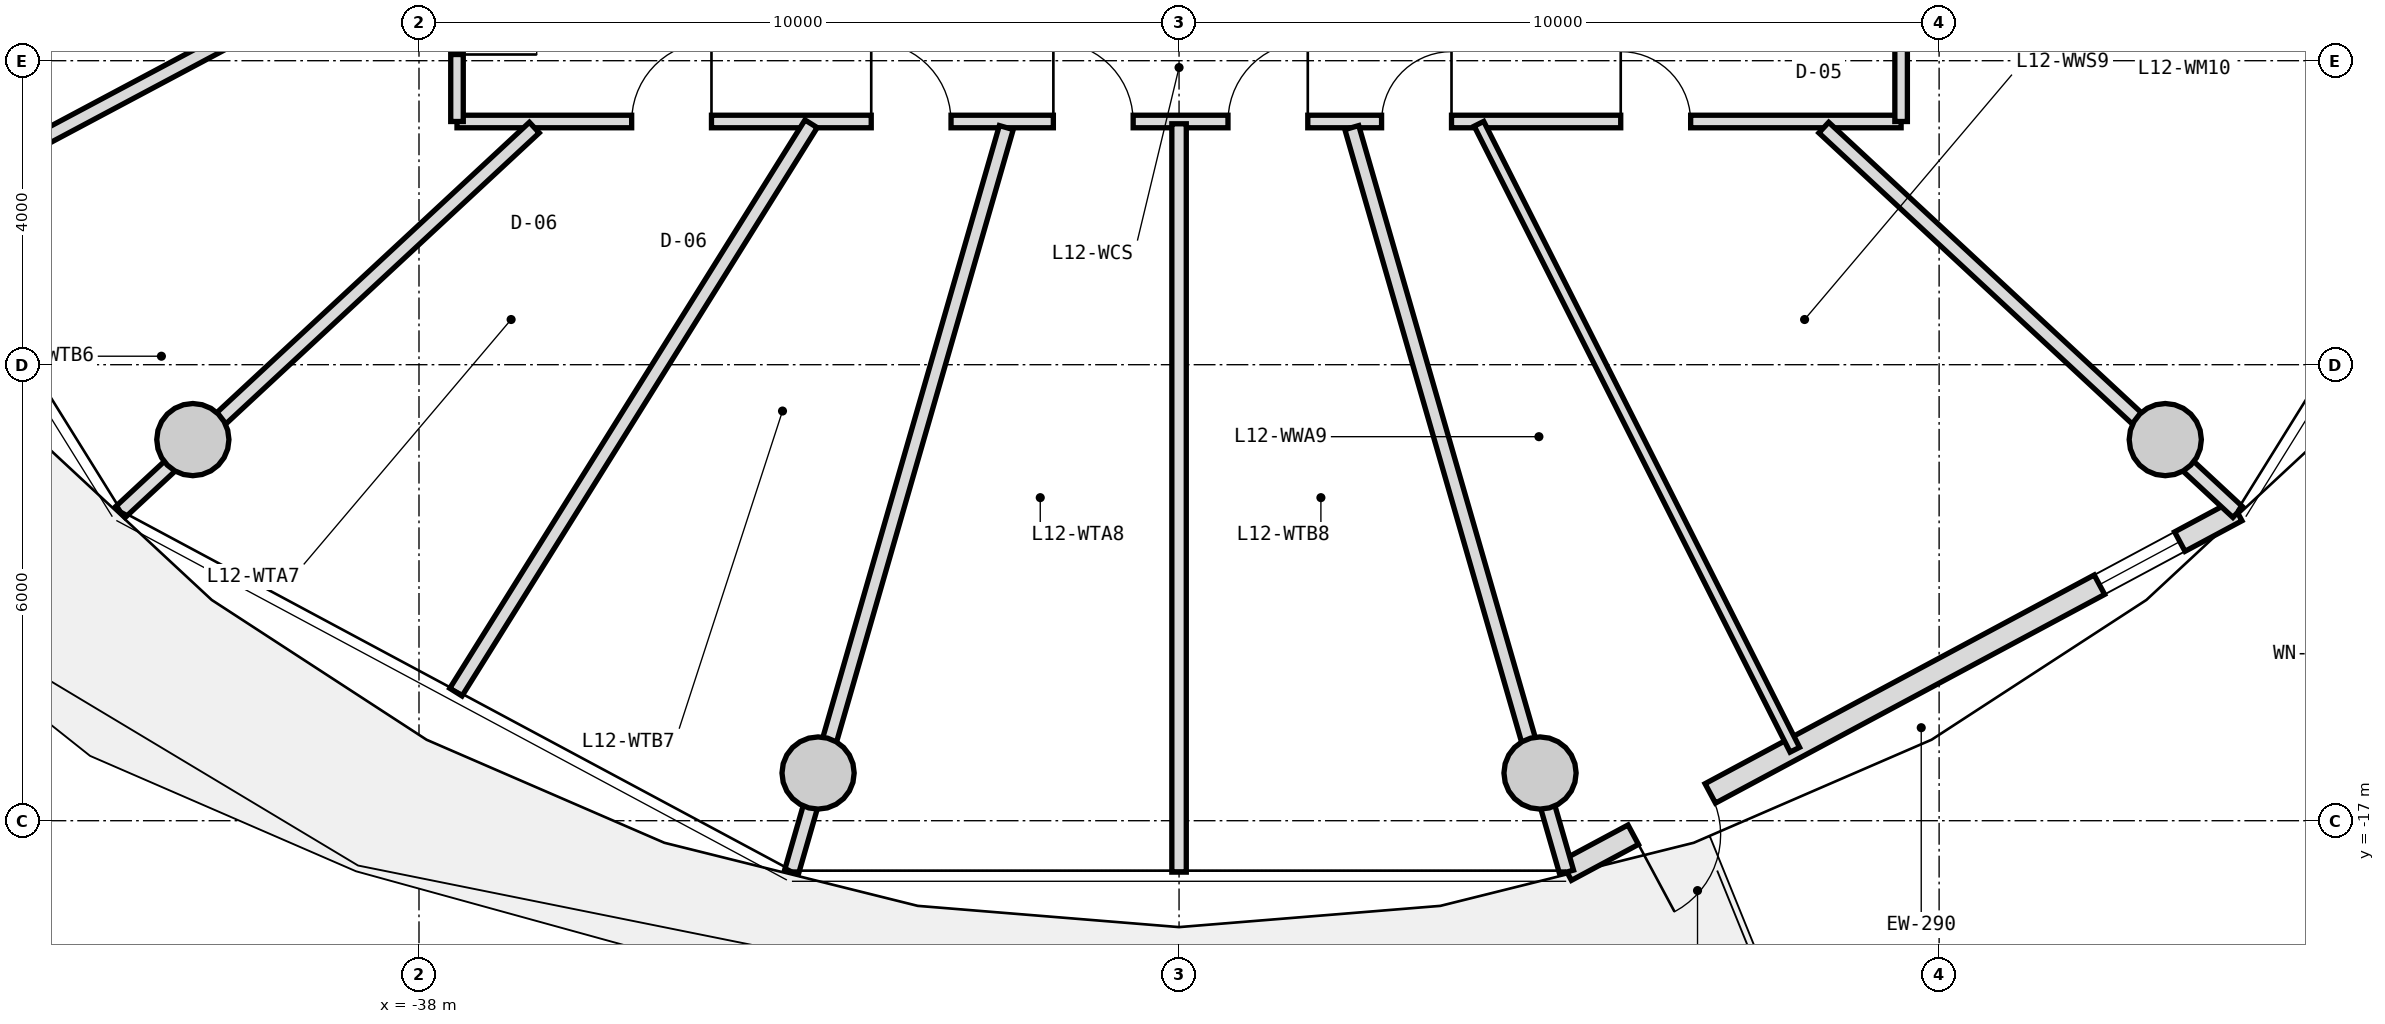
"""IFC4 building model, lengths in metres.
Left out: names, types, materials, properties, quantities, classifications, styles, units other than length and angle.
Written with IfcOpenShell. Run it as: python <this file> out.ifc"""

import sys

from ifc_helpers import new_model, si_unit, direction, frame, frame_2d, origin, origin_2d, place, context, subcontext, project, spatial, rectangle, circle, extrude, source, transform, mapped, element, fill, save


model = new_model("IFC4")
c1 = context("Model", 3, precision=1e-05, world=origin(), true_north=direction((0.0, 1.0)))
c2 = subcontext(c1, "Body", "Model", "MODEL_VIEW")
j1 = project(units=[si_unit("LENGTHUNIT", "METRE"), si_unit("PLANEANGLEUNIT", "RADIAN")], contexts=[c1])
p1 = place(None, origin())
s1 = spatial("IfcSite", under=j1, at=p1, CompositionType="ELEMENT")
p2 = place(p1, origin())
s2 = spatial("IfcBuilding", under=s1, at=p2, CompositionType="ELEMENT")
p3 = place(p2, frame((0.0, 0.0, 42.95)))
s3 = spatial("IfcBuildingStorey", under=s2, at=p3, CompositionType="ELEMENT", Elevation=42.95)
m1 = source(origin(), c2, "Body", "SweptSolid", [
    extrude(circle(Radius=0.475, at=origin_2d()), origin(), (0.0, 0.0, 1.0), 3.05),
])
for number, where, z_axis, x_axis in (
    (1, (-40.975, -11.985, 0.0), (0.0, 0.0, 1.0), (1.0, 0.0, 0.0)),
    (2, (-32.749, -16.373, 0.0), (0.0, 0.0, 1.0), (1.0, 0.0, 0.0)),
    (3, (-23.251, -16.373, 0.0), (0.0, 0.0, 1.0), (1.0, 0.0, 0.0)),
    (4, (-15.025, -11.985, 0.0), (0.0, 0.0, 1.0), (1.0, 0.0, 0.0)),
):
    element("IfcColumn", number, at=place(p3, frame(where, z_axis=z_axis, x_axis=x_axis)), inside=s3, PredefinedType="COLUMN", context=c2, shape_type="MappedRepresentation", body=[
        mapped(m1, transform((0.0, 0.0, 0.0), x_axis=(1.0, 0.0, 0.0), y_axis=(0.0, 1.0, 0.0), z_axis=(0.0, 0.0, 1.0), scale=1.0)),
    ])
m2 = source(origin(), c2, "Body", "SweptSolid", [
    extrude(rectangle(XDim=10.011, YDim=0.29, at=frame_2d((5.005, 0.0))), origin(), (0.0, 0.0, 1.0), 2.79),
])
p4 = place(p3, frame((-14.084, -12.926, 0.0), z_axis=(0.0, 0.0, 1.0), x_axis=(-0.881272505317, -0.472608475773, 0.0)))
e5 = element("IfcWall", 5, at=p4, inside=s3, PredefinedType="SOLIDWALL", context=c2, shape_type="MappedRepresentation", body=[
    mapped(m2, transform((0.0, 0.0, 0.0), x_axis=(1.0, 0.0, 0.0), y_axis=(0.0, 1.0, 0.0), z_axis=(0.0, 0.0, 1.0), scale=1.0)),
])
p5 = place(p4, frame((7.86, 0.0, 0.0)))
e6 = element("IfcOpeningElement", 6, at=p5, cuts=e5, PredefinedType="OPENING", context=c2, shape_type="SweptSolid", body=[
    extrude(rectangle(XDim=1.15, YDim=2.25, at=frame_2d((0.575, 1.125))), frame((0.0, 0.155, 0.0), z_axis=(0.0, -1.0, 0.0), x_axis=(1.0, 0.0, 0.0)), (0.0, 0.0, 1.0), 0.31),
])
p6 = place(p4, frame((0.85, 0.0, 0.85)))
e7 = element("IfcOpeningElement", 7, at=p6, cuts=e5, PredefinedType="OPENING", context=c2, shape_type="SweptSolid", body=[
    extrude(rectangle(XDim=1.2, YDim=1.5, at=frame_2d((0.6, 0.75))), frame((0.0, 0.155, 0.0), z_axis=(0.0, -1.0, 0.0), x_axis=(1.0, 0.0, 0.0)), (0.0, 0.0, 1.0), 0.31),
])
m3 = source(origin(), c2, "Body", "SweptSolid", [
    extrude(rectangle(XDim=19.0, YDim=0.165, at=frame_2d((9.5, 0.0))), origin(), (0.0, 0.0, 1.0), 2.775),
])
p7 = place(p3, frame((-18.5, -7.8, 0.0), z_axis=(0.0, 0.0, 1.0), x_axis=(-1.0, 0.0, 0.0)))
e8 = element("IfcWall", 8, at=p7, inside=s3, PredefinedType="PARTITIONING", context=c2, shape_type="MappedRepresentation", body=[
    mapped(m3, transform((0.0, 0.0, 0.0), x_axis=(1.0, 0.0, 0.0), y_axis=(0.0, 1.0, 0.0), z_axis=(0.0, 0.0, 1.0), scale=1.0)),
])
p8 = place(p7, frame((15.652, 0.0, 0.0)))
e9 = element("IfcOpeningElement", 9, at=p8, cuts=e8, PredefinedType="OPENING", context=c2, shape_type="SweptSolid", body=[
    extrude(rectangle(XDim=1.05, YDim=2.15, at=frame_2d((0.525, 1.075))), frame((0.0, 0.093, 0.0), z_axis=(0.0, -1.0, 0.0), x_axis=(1.0, 0.0, 0.0)), (0.0, 0.0, 1.0), 0.185),
])
p9 = place(p7, frame((12.5, 0.0, 0.0)))
e10 = element("IfcOpeningElement", 10, at=p9, cuts=e8, PredefinedType="OPENING", context=c2, shape_type="SweptSolid", body=[
    extrude(rectangle(XDim=1.05, YDim=2.15, at=frame_2d((0.525, 1.075))), frame((0.0, 0.093, 0.0), z_axis=(0.0, -1.0, 0.0), x_axis=(1.0, 0.0, 0.0)), (0.0, 0.0, 1.0), 0.185),
])
p10 = place(p7, frame((10.104, 0.0, 0.0)))
e11 = element("IfcOpeningElement", 11, at=p10, cuts=e8, PredefinedType="OPENING", context=c2, shape_type="SweptSolid", body=[
    extrude(rectangle(XDim=1.05, YDim=2.15, at=frame_2d((0.525, 1.075))), frame((0.0, 0.093, 0.0), z_axis=(0.0, -1.0, 0.0), x_axis=(1.0, 0.0, 0.0)), (0.0, 0.0, 1.0), 0.185),
])
p11 = place(p7, frame((7.806, 0.0, 0.0)))
e12 = element("IfcOpeningElement", 12, at=p11, cuts=e8, PredefinedType="OPENING", context=c2, shape_type="SweptSolid", body=[
    extrude(rectangle(XDim=1.05, YDim=2.15, at=frame_2d((0.525, 1.075))), frame((0.0, 0.093, 0.0), z_axis=(0.0, -1.0, 0.0), x_axis=(1.0, 0.0, 0.0)), (0.0, 0.0, 1.0), 0.185),
])
p12 = place(p7, frame((5.915, 0.0, 0.0)))
e13 = element("IfcOpeningElement", 13, at=p12, cuts=e8, PredefinedType="OPENING", context=c2, shape_type="SweptSolid", body=[
    extrude(rectangle(XDim=0.92, YDim=2.1, at=frame_2d((0.46, 1.05))), frame((0.0, 0.093, 0.0), z_axis=(0.0, -1.0, 0.0), x_axis=(1.0, 0.0, 0.0)), (0.0, 0.0, 1.0), 0.185),
])
p13 = place(p7, frame((2.769, 0.0, 0.0)))
e14 = element("IfcOpeningElement", 14, at=p13, cuts=e8, PredefinedType="OPENING", context=c2, shape_type="SweptSolid", body=[
    extrude(rectangle(XDim=0.92, YDim=2.1, at=frame_2d((0.46, 1.05))), frame((0.0, 0.093, 0.0), z_axis=(0.0, -1.0, 0.0), x_axis=(1.0, 0.0, 0.0)), (0.0, 0.0, 1.0), 0.185),
])
m4 = source(origin(), c2, "Body", "SweptSolid", [
    extrude(rectangle(XDim=15.6, YDim=0.165, at=frame_2d((7.8, 0.0))), origin(), (0.0, 0.0, 1.0), 2.775),
])
p14 = place(p3, frame((-37.5, -7.8, 0.0), z_axis=(0.0, 0.0, 1.0), x_axis=(0.0, 1.0, 0.0)))
e15 = element("IfcWall", 15, at=p14, inside=s3, PredefinedType="PARTITIONING", context=c2, shape_type="MappedRepresentation", body=[
    mapped(m4, transform((0.0, 0.0, 0.0), x_axis=(1.0, 0.0, 0.0), y_axis=(0.0, 1.0, 0.0), z_axis=(0.0, 0.0, 1.0), scale=1.0)),
])
p15 = place(p14, frame((13.293, 0.0, 0.0)))
e16 = element("IfcOpeningElement", 16, at=p15, cuts=e15, PredefinedType="OPENING", context=c2, shape_type="SweptSolid", body=[
    extrude(rectangle(XDim=1.05, YDim=2.15, at=frame_2d((0.525, 1.075))), frame((0.0, 0.093, 0.0), z_axis=(0.0, -1.0, 0.0), x_axis=(1.0, 0.0, 0.0)), (0.0, 0.0, 1.0), 0.185),
])
p16 = place(p14, frame((11.018, 0.0, 0.0)))
e17 = element("IfcOpeningElement", 17, at=p16, cuts=e15, PredefinedType="OPENING", context=c2, shape_type="SweptSolid", body=[
    extrude(rectangle(XDim=1.05, YDim=2.15, at=frame_2d((0.525, 1.075))), frame((0.0, 0.093, 0.0), z_axis=(0.0, -1.0, 0.0), x_axis=(1.0, 0.0, 0.0)), (0.0, 0.0, 1.0), 0.185),
])
p17 = place(p14, frame((7.812, 0.0, 0.0)))
e18 = element("IfcOpeningElement", 18, at=p17, cuts=e15, PredefinedType="OPENING", context=c2, shape_type="SweptSolid", body=[
    extrude(rectangle(XDim=1.05, YDim=2.15, at=frame_2d((0.525, 1.075))), frame((0.0, 0.093, 0.0), z_axis=(0.0, -1.0, 0.0), x_axis=(1.0, 0.0, 0.0)), (0.0, 0.0, 1.0), 0.185),
])
p18 = place(p14, frame((6.035, 0.0, 0.0)))
e19 = element("IfcOpeningElement", 19, at=p18, cuts=e15, PredefinedType="OPENING", context=c2, shape_type="SweptSolid", body=[
    extrude(rectangle(XDim=1.05, YDim=2.15, at=frame_2d((0.525, 1.075))), frame((0.0, 0.093, 0.0), z_axis=(0.0, -1.0, 0.0), x_axis=(1.0, 0.0, 0.0)), (0.0, 0.0, 1.0), 0.185),
])
p19 = place(p14, frame((3.489, 0.0, 0.0)))
e20 = element("IfcOpeningElement", 20, at=p19, cuts=e15, PredefinedType="OPENING", context=c2, shape_type="SweptSolid", body=[
    extrude(rectangle(XDim=1.05, YDim=2.15, at=frame_2d((0.525, 1.075))), frame((0.0, 0.093, 0.0), z_axis=(0.0, -1.0, 0.0), x_axis=(1.0, 0.0, 0.0)), (0.0, 0.0, 1.0), 0.185),
])
p20 = place(p14, frame((0.882, 0.0, 0.0)))
e21 = element("IfcOpeningElement", 21, at=p20, cuts=e15, PredefinedType="OPENING", context=c2, shape_type="SweptSolid", body=[
    extrude(rectangle(XDim=1.05, YDim=2.15, at=frame_2d((0.525, 1.075))), frame((0.0, 0.093, 0.0), z_axis=(0.0, -1.0, 0.0), x_axis=(1.0, 0.0, 0.0)), (0.0, 0.0, 1.0), 0.185),
])
p21 = place(p3, frame((-18.5, 7.8, 0.0), z_axis=(0.0, 0.0, 1.0), x_axis=(0.0, -1.0, 0.0)))
e22 = element("IfcWall", 22, at=p21, inside=s3, PredefinedType="PARTITIONING", context=c2, shape_type="MappedRepresentation", body=[
    mapped(m4, transform((0.0, 0.0, 0.0), x_axis=(1.0, 0.0, 0.0), y_axis=(0.0, 1.0, 0.0), z_axis=(0.0, 0.0, 1.0), scale=1.0)),
])
p22 = place(p21, frame((12.141, 0.0, 0.0)))
e23 = element("IfcOpeningElement", 23, at=p22, cuts=e22, PredefinedType="OPENING", context=c2, shape_type="SweptSolid", body=[
    extrude(rectangle(XDim=1.25, YDim=2.2, at=frame_2d((0.625, 1.1))), frame((0.0, 0.093, 0.0), z_axis=(0.0, -1.0, 0.0), x_axis=(1.0, 0.0, 0.0)), (0.0, 0.0, 1.0), 0.185),
])
p23 = place(p21, frame((7.175, 0.0, 0.0)))
e24 = element("IfcOpeningElement", 24, at=p23, cuts=e22, PredefinedType="OPENING", context=c2, shape_type="SweptSolid", body=[
    extrude(rectangle(XDim=1.25, YDim=2.2, at=frame_2d((0.625, 1.1))), frame((0.0, 0.093, 0.0), z_axis=(0.0, -1.0, 0.0), x_axis=(1.0, 0.0, 0.0)), (0.0, 0.0, 1.0), 0.185),
])
p24 = place(p21, frame((2.826, 0.0, 0.0)))
e25 = element("IfcOpeningElement", 25, at=p24, cuts=e22, PredefinedType="OPENING", context=c2, shape_type="SweptSolid", body=[
    extrude(rectangle(XDim=1.05, YDim=2.15, at=frame_2d((0.525, 1.075))), frame((0.0, 0.093, 0.0), z_axis=(0.0, -1.0, 0.0), x_axis=(1.0, 0.0, 0.0)), (0.0, 0.0, 1.0), 0.185),
])
p25 = place(p21, frame((0.881, 0.0, 0.0)))
e26 = element("IfcOpeningElement", 26, at=p25, cuts=e22, PredefinedType="OPENING", context=c2, shape_type="SweptSolid", body=[
    extrude(rectangle(XDim=1.05, YDim=2.15, at=frame_2d((0.525, 1.075))), frame((0.0, 0.093, 0.0), z_axis=(0.0, -1.0, 0.0), x_axis=(1.0, 0.0, 0.0)), (0.0, 0.0, 1.0), 0.185),
])
m5 = source(origin(), c2, "Body", "SweptSolid", [
    extrude(rectangle(XDim=7.435, YDim=0.19, at=frame_2d((3.717, 0.0))), origin(), (0.0, 0.0, 1.0), 2.415),
])
p26 = place(p3, frame((-36.483, -7.88, 0.0), z_axis=(0.0, 0.0, 1.0), x_axis=(-0.732651956848, -0.680603489652, 0.0)))
e27 = element("IfcWall", 27, at=p26, inside=s3, PredefinedType="PARTITIONING", context=c2, shape_type="MappedRepresentation", body=[
    mapped(m5, transform((0.0, 0.0, 0.0), x_axis=(1.0, 0.0, 0.0), y_axis=(0.0, 1.0, 0.0), z_axis=(0.0, 0.0, 1.0), scale=1.0)),
])
m6 = source(origin(), c2, "Body", "SweptSolid", [
    extrude(rectangle(XDim=7.873, YDim=0.19, at=frame_2d((3.937, 0.0))), origin(), (0.0, 0.0, 1.0), 2.775),
])
p27 = place(p3, frame((-37.53, -5.138, 0.0), z_axis=(0.0, 0.0, 1.0), x_axis=(-0.882666052726, -0.470000680175, 0.0)))
e28 = element("IfcWall", 28, at=p27, inside=s3, PredefinedType="PARTITIONING", context=c2, shape_type="MappedRepresentation", body=[
    mapped(m6, transform((0.0, 0.0, 0.0), x_axis=(1.0, 0.0, 0.0), y_axis=(0.0, 1.0, 0.0), z_axis=(0.0, 0.0, 1.0), scale=1.0)),
])
m7 = source(origin(), c2, "Body", "SweptSolid", [
    extrude(rectangle(XDim=10.196, YDim=0.19, at=frame_2d((5.098, 0.0))), origin(), (0.0, 0.0, 1.0), 2.225),
])
p28 = place(p3, frame((-30.273, -7.88, 0.0), z_axis=(0.0, 0.0, 1.0), x_axis=(-0.277136420347, -0.960830580549, 0.0)))
e29 = element("IfcWall", 29, at=p28, inside=s3, PredefinedType="PARTITIONING", context=c2, shape_type="MappedRepresentation", body=[
    mapped(m7, transform((0.0, 0.0, 0.0), x_axis=(1.0, 0.0, 0.0), y_axis=(0.0, 1.0, 0.0), z_axis=(0.0, 0.0, 1.0), scale=1.0)),
])
m8 = source(origin(), c2, "Body", "SweptSolid", [
    extrude(rectangle(XDim=8.818, YDim=0.19, at=frame_2d((4.409, 0.0))), origin(), (0.0, 0.0, 1.0), 2.775),
])
p29 = place(p3, frame((-32.841, -7.83, 0.0), z_axis=(0.0, 0.0, 1.0), x_axis=(-0.529931746109, -0.848040296487, 0.0)))
e30 = element("IfcWall", 30, at=p29, inside=s3, PredefinedType="PARTITIONING", context=c2, shape_type="MappedRepresentation", body=[
    mapped(m8, transform((0.0, 0.0, 0.0), x_axis=(1.0, 0.0, 0.0), y_axis=(0.0, 1.0, 0.0), z_axis=(0.0, 0.0, 1.0), scale=1.0)),
])
p30 = place(p3, frame((-25.727, -7.88, 0.0), z_axis=(0.0, 0.0, 1.0), x_axis=(0.277136420347, -0.960830580549, 0.0)))
e31 = element("IfcWall", 31, at=p30, inside=s3, PredefinedType="PARTITIONING", context=c2, shape_type="MappedRepresentation", body=[
    mapped(m7, transform((0.0, 0.0, 0.0), x_axis=(1.0, 0.0, 0.0), y_axis=(0.0, 1.0, 0.0), z_axis=(0.0, 0.0, 1.0), scale=1.0)),
])
m9 = source(origin(), c2, "Body", "SweptSolid", [
    extrude(rectangle(XDim=9.846, YDim=0.19, at=frame_2d((4.923, 0.0))), origin(), (0.0, 0.0, 1.0), 2.775),
])
p31 = place(p3, frame((-28.0, -7.83, 0.0), z_axis=(0.0, 0.0, 1.0), x_axis=(0.0, -1.0, 0.0)))
e32 = element("IfcWall", 32, at=p31, inside=s3, PredefinedType="PARTITIONING", context=c2, shape_type="MappedRepresentation", body=[
    mapped(m9, transform((0.0, 0.0, 0.0), x_axis=(1.0, 0.0, 0.0), y_axis=(0.0, 1.0, 0.0), z_axis=(0.0, 0.0, 1.0), scale=1.0)),
])
m10 = source(origin(), c2, "Body", "SweptSolid", [
    extrude(rectangle(XDim=7.435, YDim=0.19, at=frame_2d((3.717, 0.0))), origin(), (0.0, 0.0, 1.0), 2.225),
])
p32 = place(p3, frame((-19.517, -7.88, 0.0), z_axis=(0.0, 0.0, 1.0), x_axis=(0.732651956848, -0.680603489652, 0.0)))
e33 = element("IfcWall", 33, at=p32, inside=s3, PredefinedType="PARTITIONING", context=c2, shape_type="MappedRepresentation", body=[
    mapped(m10, transform((0.0, 0.0, 0.0), x_axis=(1.0, 0.0, 0.0), y_axis=(0.0, 1.0, 0.0), z_axis=(0.0, 0.0, 1.0), scale=1.0)),
])
m11 = source(origin(), c2, "Body", "SweptSolid", [
    extrude(rectangle(XDim=9.225, YDim=0.14, at=frame_2d((4.613, 0.0))), origin(), (0.0, 0.0, 1.0), 2.775),
])
p33 = place(p3, frame((-24.054, -7.83, 0.0), z_axis=(0.0, 0.0, 1.0), x_axis=(0.450460543767, -0.892796336523, 0.0)))
e34 = element("IfcWall", 34, at=p33, inside=s3, PredefinedType="PARTITIONING", context=c2, shape_type="MappedRepresentation", body=[
    mapped(m11, transform((0.0, 0.0, 0.0), x_axis=(1.0, 0.0, 0.0), y_axis=(0.0, 1.0, 0.0), z_axis=(0.0, 0.0, 1.0), scale=1.0)),
])
m12 = source(origin(), c2, "Body", "SweptSolid", [
    extrude(rectangle(XDim=1.15, YDim=2.25, at=frame_2d((0.575, 1.125))), frame((0.0, 0.025, 0.0), z_axis=(0.0, -1.0, 0.0), x_axis=(1.0, 0.0, 0.0)), (0.0, 0.0, 1.0), 0.05),
])
p34 = place(p5, origin())
e35 = element("IfcDoor", 35, at=p34, inside=s3, OperationType="SINGLE_SWING_RIGHT", PredefinedType="DOOR", context=c2, shape_type="MappedRepresentation", body=[
    mapped(m12, transform((0.0, 0.0, 0.0), x_axis=(1.0, 0.0, 0.0), y_axis=(0.0, 1.0, 0.0), z_axis=(0.0, 0.0, 1.0), scale=1.0)),
])
fill(e6, e35)
m13 = source(origin(), c2, "Body", "SweptSolid", [
    extrude(rectangle(XDim=1.2, YDim=1.5, at=frame_2d((0.6, 0.75))), frame((0.0, 0.03, 0.0), z_axis=(0.0, -1.0, 0.0), x_axis=(1.0, 0.0, 0.0)), (0.0, 0.0, 1.0), 0.06),
])
p35 = place(p6, origin())
e36 = element("IfcWindow", 36, at=p35, inside=s3, PartitioningType="SINGLE_PANEL", PredefinedType="WINDOW", context=c2, shape_type="MappedRepresentation", body=[
    mapped(m13, transform((0.0, 0.0, 0.0), x_axis=(1.0, 0.0, 0.0), y_axis=(0.0, 1.0, 0.0), z_axis=(0.0, 0.0, 1.0), scale=1.0)),
])
fill(e7, e36)
m14 = source(origin(), c2, "Body", "SweptSolid", [
    extrude(rectangle(XDim=1.05, YDim=2.15, at=frame_2d((0.525, 1.075))), frame((0.0, 0.025, 0.0), z_axis=(0.0, -1.0, 0.0), x_axis=(1.0, 0.0, 0.0)), (0.0, 0.0, 1.0), 0.05),
])
p36 = place(p20, frame((1.05, 0.0, 0.0), z_axis=(0.0, 0.0, 1.0), x_axis=(-1.0, 0.0, 0.0)))
e37 = element("IfcDoor", 37, at=p36, inside=s3, OperationType="SINGLE_SWING_RIGHT", PredefinedType="DOOR", context=c2, shape_type="MappedRepresentation", body=[
    mapped(m14, transform((0.0, 0.0, 0.0), x_axis=(1.0, 0.0, 0.0), y_axis=(0.0, 1.0, 0.0), z_axis=(0.0, 0.0, 1.0), scale=1.0)),
])
fill(e21, e37)
p37 = place(p8, frame((1.05, 0.0, 0.0), z_axis=(0.0, 0.0, 1.0), x_axis=(-1.0, 0.0, 0.0)))
e38 = element("IfcDoor", 38, at=p37, inside=s3, OperationType="SINGLE_SWING_RIGHT", PredefinedType="DOOR", context=c2, shape_type="MappedRepresentation", body=[
    mapped(m14, transform((0.0, 0.0, 0.0), x_axis=(1.0, 0.0, 0.0), y_axis=(0.0, 1.0, 0.0), z_axis=(0.0, 0.0, 1.0), scale=1.0)),
])
fill(e9, e38)
p38 = place(p9, frame((1.05, 0.0, 0.0), z_axis=(0.0, 0.0, 1.0), x_axis=(-1.0, 0.0, 0.0)))
e39 = element("IfcDoor", 39, at=p38, inside=s3, OperationType="SINGLE_SWING_LEFT", PredefinedType="DOOR", context=c2, shape_type="MappedRepresentation", body=[
    mapped(m14, transform((0.0, 0.0, 0.0), x_axis=(1.0, 0.0, 0.0), y_axis=(0.0, 1.0, 0.0), z_axis=(0.0, 0.0, 1.0), scale=1.0)),
])
fill(e10, e39)
p39 = place(p10, frame((1.05, 0.0, 0.0), z_axis=(0.0, 0.0, 1.0), x_axis=(-1.0, 0.0, 0.0)))
e40 = element("IfcDoor", 40, at=p39, inside=s3, OperationType="SINGLE_SWING_LEFT", PredefinedType="DOOR", context=c2, shape_type="MappedRepresentation", body=[
    mapped(m14, transform((0.0, 0.0, 0.0), x_axis=(1.0, 0.0, 0.0), y_axis=(0.0, 1.0, 0.0), z_axis=(0.0, 0.0, 1.0), scale=1.0)),
])
fill(e11, e40)
p40 = place(p11, frame((1.05, 0.0, 0.0), z_axis=(0.0, 0.0, 1.0), x_axis=(-1.0, 0.0, 0.0)))
e41 = element("IfcDoor", 41, at=p40, inside=s3, OperationType="SINGLE_SWING_RIGHT", PredefinedType="DOOR", context=c2, shape_type="MappedRepresentation", body=[
    mapped(m14, transform((0.0, 0.0, 0.0), x_axis=(1.0, 0.0, 0.0), y_axis=(0.0, 1.0, 0.0), z_axis=(0.0, 0.0, 1.0), scale=1.0)),
])
fill(e12, e41)
m15 = source(origin(), c2, "Body", "SweptSolid", [
    extrude(rectangle(XDim=0.92, YDim=2.1, at=frame_2d((0.46, 1.05))), frame((0.0, 0.025, 0.0), z_axis=(0.0, -1.0, 0.0), x_axis=(1.0, 0.0, 0.0)), (0.0, 0.0, 1.0), 0.05),
])
p41 = place(p12, frame((0.92, 0.0, 0.0), z_axis=(0.0, 0.0, 1.0), x_axis=(-1.0, 0.0, 0.0)))
e42 = element("IfcDoor", 42, at=p41, inside=s3, OperationType="SINGLE_SWING_RIGHT", PredefinedType="DOOR", context=c2, shape_type="MappedRepresentation", body=[
    mapped(m15, transform((0.0, 0.0, 0.0), x_axis=(1.0, 0.0, 0.0), y_axis=(0.0, 1.0, 0.0), z_axis=(0.0, 0.0, 1.0), scale=1.0)),
])
fill(e13, e42)
p42 = place(p13, frame((0.92, 0.0, 0.0), z_axis=(0.0, 0.0, 1.0), x_axis=(-1.0, 0.0, 0.0)))
e43 = element("IfcDoor", 43, at=p42, inside=s3, OperationType="SINGLE_SWING_LEFT", PredefinedType="DOOR", context=c2, shape_type="MappedRepresentation", body=[
    mapped(m15, transform((0.0, 0.0, 0.0), x_axis=(1.0, 0.0, 0.0), y_axis=(0.0, 1.0, 0.0), z_axis=(0.0, 0.0, 1.0), scale=1.0)),
])
fill(e14, e43)
save(model, sys.argv[1])
